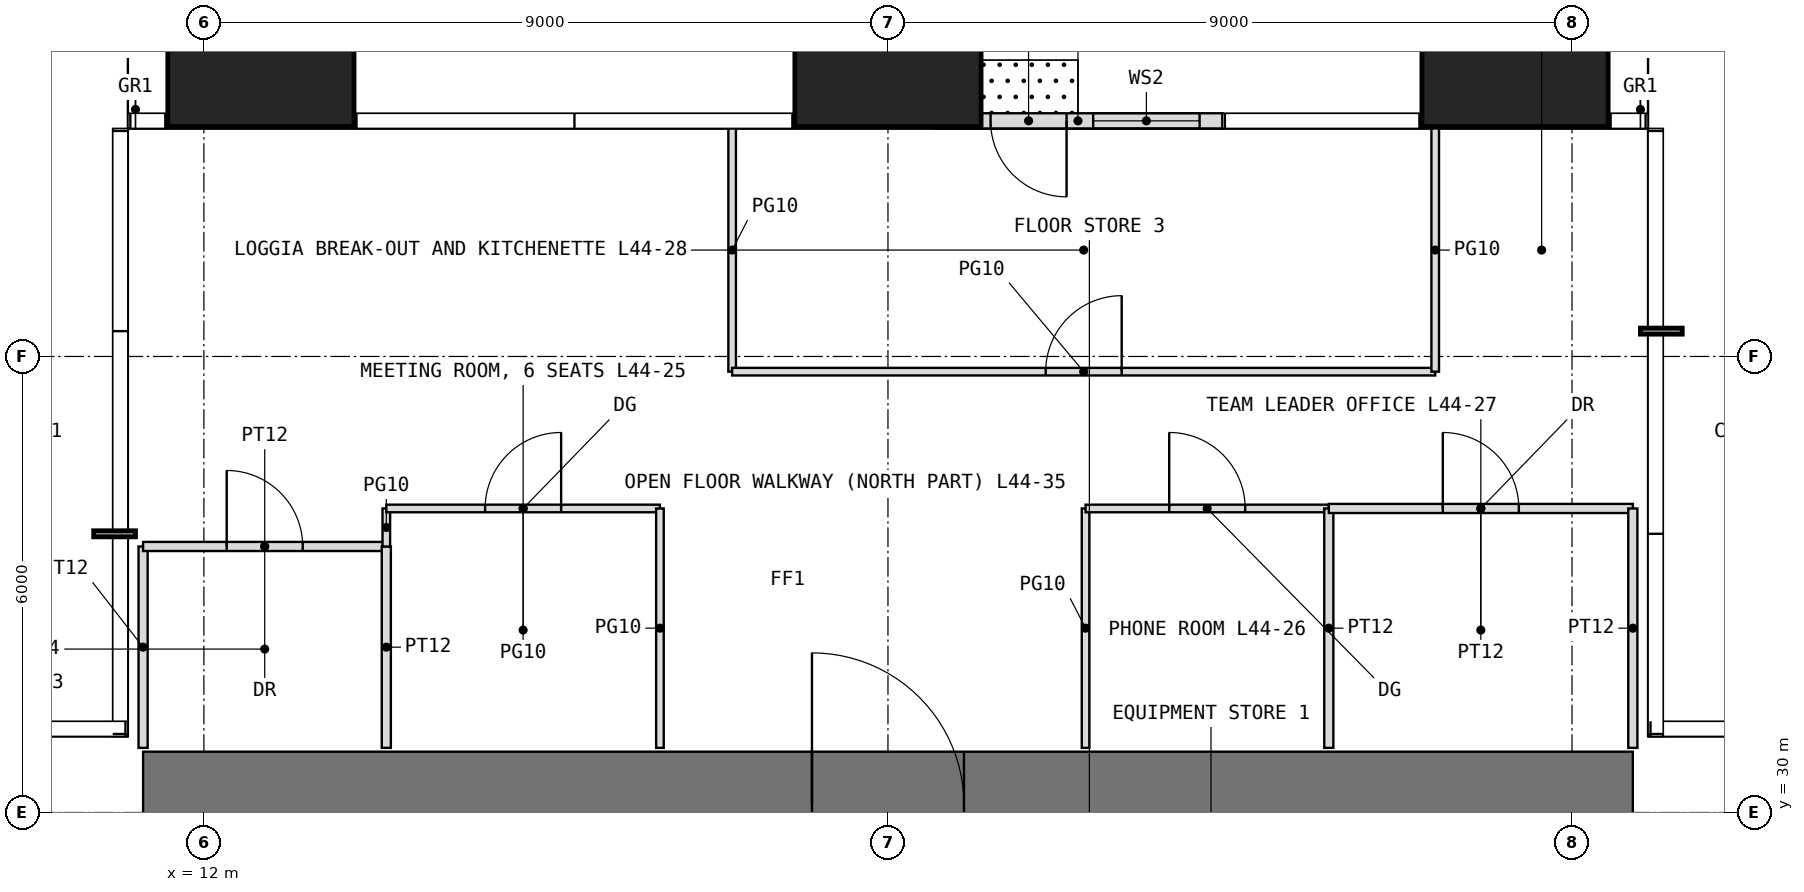
"""IFC4 building model, lengths in metres.
Left out: names, types, materials, properties, quantities, classifications, styles, units other than length and angle.
Written with IfcOpenShell. Run it as: python <this file> out.ifc"""

import sys

from ifc_helpers import new_model, si_unit, direction, frame, frame_2d, origin, origin_2d, place, context, subcontext, project, spatial, rectangle, extrude, element, fill, save


model = new_model("IFC4")
c1 = context("Model", 3, precision=1e-05, world=origin(), true_north=direction((0.0, 1.0)))
c2 = subcontext(c1, "Body", "Model", "MODEL_VIEW")
j1 = project(units=[si_unit("LENGTHUNIT", "METRE"), si_unit("PLANEANGLEUNIT", "RADIAN")], contexts=[c1])
p1 = place(None, origin())
s1 = spatial("IfcSite", under=j1, at=p1, CompositionType="ELEMENT")
p2 = place(p1, origin())
s2 = spatial("IfcBuilding", under=s1, at=p2, CompositionType="ELEMENT")
p3 = place(p2, frame((0.0, 0.0, 186.5)))
s3 = spatial("IfcBuildingStorey", under=s2, at=p3, CompositionType="ELEMENT", Elevation=186.5)
for number, where, z_axis, x_axis in (
    (1, (12.75, 40.25, 0.0), (0.0, 0.0, 1.0), (1.0, 0.0, 0.0)),
    (2, (21.0, 40.25, 0.0), (0.0, 0.0, 1.0), (1.0, 0.0, 0.0)),
    (3, (29.25, 40.25, 0.0), (0.0, 0.0, 1.0), (1.0, 0.0, 0.0)),
):
    element("IfcColumn", number, at=place(p3, frame(where, z_axis=z_axis, x_axis=x_axis)), inside=s3, PredefinedType="COLUMN", context=c2, shape_type="SweptSolid", body=[
        extrude(rectangle(XDim=2.45, YDim=2.45, at=origin_2d()), origin(), (0.0, 0.0, 1.0), 4.0),
    ])
p4 = place(p3, frame((25.4, 39.1, 0.0), z_axis=(0.0, 0.0, 1.0), x_axis=(-1.0, 0.0, 0.0)))
e4 = element("IfcWall", 4, at=p4, inside=s3, PredefinedType="USERDEFINED", context=c2, shape_type="SweptSolid", body=[
    extrude(rectangle(XDim=3.8, YDim=0.2, at=frame_2d((1.9, 0.0))), origin(), (0.0, 0.0, 1.0), 3.75),
])
p5 = place(p4, frame((2.05, 0.0, 0.0)))
e5 = element("IfcOpeningElement", 5, at=p5, cuts=e4, PredefinedType="OPENING", context=c2, shape_type="SweptSolid", body=[
    extrude(rectangle(XDim=1.0, YDim=2.4, at=frame_2d((0.5, 1.2))), frame((0.0, 0.11, 0.0), z_axis=(0.0, -1.0, 0.0), x_axis=(1.0, 0.0, 0.0)), (0.0, 0.0, 1.0), 0.22),
])
p6 = place(p4, frame((0.3, 0.0, 0.3)))
e6 = element("IfcOpeningElement", 6, at=p6, cuts=e4, PredefinedType="OPENING", context=c2, shape_type="SweptSolid", body=[
    extrude(rectangle(XDim=1.4, YDim=2.7, at=frame_2d((0.7, 1.35))), frame((0.0, 0.11, 0.0), z_axis=(0.0, -1.0, 0.0), x_axis=(1.0, 0.0, 0.0)), (0.0, 0.0, 1.0), 0.22),
])
p7 = place(p3, frame((11.2, 30.1, -0.05), z_axis=(0.0, 0.0, 1.0), x_axis=(1.0, 0.0, 0.0)))
e7 = element("IfcWall", 7, at=p7, inside=s3, PredefinedType="SHEAR", context=c2, shape_type="SweptSolid", body=[
    extrude(rectangle(XDim=19.6, YDim=1.4, at=frame_2d((9.8, 0.0))), origin(), (0.0, 0.0, 1.0), 4.0),
])
p8 = place(p7, frame((8.8, 0.0, 0.05)))
e8 = element("IfcOpeningElement", 8, at=p8, cuts=e7, PredefinedType="OPENING", context=c2, shape_type="SweptSolid", body=[
    extrude(rectangle(XDim=2.0, YDim=2.2, at=frame_2d((1.0, 1.1))), frame((0.0, 0.71, 0.0), z_axis=(0.0, -1.0, 0.0), x_axis=(1.0, 0.0, 0.0)), (0.0, 0.0, 1.0), 1.42),
])
p9 = place(p3, frame((11.2, 30.85, 0.0), z_axis=(0.0, 0.0, 1.0), x_axis=(0.0, 1.0, 0.0)))
e9 = element("IfcWall", 9, at=p9, inside=s3, PredefinedType="PARTITIONING", context=c2, shape_type="SweptSolid", body=[
    extrude(rectangle(XDim=2.65, YDim=0.12, at=frame_2d((1.325, 0.0))), origin(), (0.0, 0.0, 1.0), 3.75),
])
p10 = place(p3, frame((11.2, 33.5, 0.0), z_axis=(0.0, 0.0, 1.0), x_axis=(1.0, 0.0, 0.0)))
e10 = element("IfcWall", 10, at=p10, inside=s3, PredefinedType="PARTITIONING", context=c2, shape_type="SweptSolid", body=[
    extrude(rectangle(XDim=3.2, YDim=0.12, at=frame_2d((1.6, 0.0))), origin(), (0.0, 0.0, 1.0), 3.75),
])
p11 = place(p10, frame((1.1, 0.0, 0.0)))
e11 = element("IfcOpeningElement", 11, at=p11, cuts=e10, PredefinedType="OPENING", context=c2, shape_type="SweptSolid", body=[
    extrude(rectangle(XDim=1.0, YDim=2.2, at=frame_2d((0.5, 1.1))), frame((0.0, 0.07, 0.0), z_axis=(0.0, -1.0, 0.0), x_axis=(1.0, 0.0, 0.0)), (0.0, 0.0, 1.0), 0.14),
])
p12 = place(p3, frame((14.4, 30.85, 0.0), z_axis=(0.0, 0.0, 1.0), x_axis=(0.0, 1.0, 0.0)))
e12 = element("IfcWall", 12, at=p12, inside=s3, PredefinedType="PARTITIONING", context=c2, shape_type="SweptSolid", body=[
    extrude(rectangle(XDim=2.65, YDim=0.12, at=frame_2d((1.325, 0.0))), origin(), (0.0, 0.0, 1.0), 3.75),
])
p13 = place(p3, frame((14.4, 33.5, 0.0), z_axis=(0.0, 0.0, 1.0), x_axis=(0.0, 1.0, 0.0)))
e13 = element("IfcWall", 13, at=p13, inside=s3, PredefinedType="PARTITIONING", context=c2, shape_type="SweptSolid", body=[
    extrude(rectangle(XDim=0.5, YDim=0.1, at=frame_2d((0.25, 0.0))), origin(), (0.0, 0.0, 1.0), 3.75),
])
p14 = place(p3, frame((14.4, 34.0, 0.0), z_axis=(0.0, 0.0, 1.0), x_axis=(1.0, 0.0, 0.0)))
e14 = element("IfcWall", 14, at=p14, inside=s3, PredefinedType="PARTITIONING", context=c2, shape_type="SweptSolid", body=[
    extrude(rectangle(XDim=3.6, YDim=0.1, at=frame_2d((1.8, 0.0))), origin(), (0.0, 0.0, 1.0), 3.75),
])
p15 = place(p14, frame((1.3, 0.0, 0.0)))
e15 = element("IfcOpeningElement", 15, at=p15, cuts=e14, PredefinedType="OPENING", context=c2, shape_type="SweptSolid", body=[
    extrude(rectangle(XDim=1.0, YDim=2.4, at=frame_2d((0.5, 1.2))), frame((0.0, 0.06, 0.0), z_axis=(0.0, -1.0, 0.0), x_axis=(1.0, 0.0, 0.0)), (0.0, 0.0, 1.0), 0.12),
])
p16 = place(p3, frame((18.0, 30.85, 0.0), z_axis=(0.0, 0.0, 1.0), x_axis=(0.0, 1.0, 0.0)))
e16 = element("IfcWall", 16, at=p16, inside=s3, PredefinedType="PARTITIONING", context=c2, shape_type="SweptSolid", body=[
    extrude(rectangle(XDim=3.15, YDim=0.1, at=frame_2d((1.575, 0.0))), origin(), (0.0, 0.0, 1.0), 3.75),
])
p17 = place(p3, frame((18.95, 35.8, 0.0), z_axis=(0.0, 0.0, 1.0), x_axis=(0.0, 1.0, 0.0)))
e17 = element("IfcWall", 17, at=p17, inside=s3, PredefinedType="PARTITIONING", context=c2, shape_type="SweptSolid", body=[
    extrude(rectangle(XDim=3.2, YDim=0.1, at=frame_2d((1.6, 0.0))), origin(), (0.0, 0.0, 1.0), 3.75),
])
p18 = place(p3, frame((18.95, 35.8, 0.0), z_axis=(0.0, 0.0, 1.0), x_axis=(1.0, 0.0, 0.0)))
e18 = element("IfcWall", 18, at=p18, inside=s3, PredefinedType="PARTITIONING", context=c2, shape_type="SweptSolid", body=[
    extrude(rectangle(XDim=9.25, YDim=0.1, at=frame_2d((4.625, 0.0))), origin(), (0.0, 0.0, 1.0), 3.75),
])
p19 = place(p18, frame((4.125, 0.0, 0.0)))
e19 = element("IfcOpeningElement", 19, at=p19, cuts=e18, PredefinedType="OPENING", context=c2, shape_type="SweptSolid", body=[
    extrude(rectangle(XDim=1.0, YDim=2.4, at=frame_2d((0.5, 1.2))), frame((0.0, 0.06, 0.0), z_axis=(0.0, -1.0, 0.0), x_axis=(1.0, 0.0, 0.0)), (0.0, 0.0, 1.0), 0.12),
])
p20 = place(p3, frame((23.6, 30.85, 0.0), z_axis=(0.0, 0.0, 1.0), x_axis=(0.0, 1.0, 0.0)))
e20 = element("IfcWall", 20, at=p20, inside=s3, PredefinedType="PARTITIONING", context=c2, shape_type="SweptSolid", body=[
    extrude(rectangle(XDim=3.15, YDim=0.1, at=frame_2d((1.575, 0.0))), origin(), (0.0, 0.0, 1.0), 3.75),
])
p21 = place(p3, frame((23.6, 34.0, 0.0), z_axis=(0.0, 0.0, 1.0), x_axis=(1.0, 0.0, 0.0)))
e21 = element("IfcWall", 21, at=p21, inside=s3, PredefinedType="PARTITIONING", context=c2, shape_type="SweptSolid", body=[
    extrude(rectangle(XDim=3.2, YDim=0.1, at=frame_2d((1.6, 0.0))), origin(), (0.0, 0.0, 1.0), 3.75),
])
p22 = place(p21, frame((1.1, 0.0, 0.0)))
e22 = element("IfcOpeningElement", 22, at=p22, cuts=e21, PredefinedType="OPENING", context=c2, shape_type="SweptSolid", body=[
    extrude(rectangle(XDim=1.0, YDim=2.4, at=frame_2d((0.5, 1.2))), frame((0.0, 0.06, 0.0), z_axis=(0.0, -1.0, 0.0), x_axis=(1.0, 0.0, 0.0)), (0.0, 0.0, 1.0), 0.12),
])
p23 = place(p3, frame((26.8, 30.85, 0.0), z_axis=(0.0, 0.0, 1.0), x_axis=(0.0, 1.0, 0.0)))
e23 = element("IfcWall", 23, at=p23, inside=s3, PredefinedType="PARTITIONING", context=c2, shape_type="SweptSolid", body=[
    extrude(rectangle(XDim=3.15, YDim=0.12, at=frame_2d((1.575, 0.0))), origin(), (0.0, 0.0, 1.0), 3.75),
])
p24 = place(p3, frame((26.8, 34.0, 0.0), z_axis=(0.0, 0.0, 1.0), x_axis=(1.0, 0.0, 0.0)))
e24 = element("IfcWall", 24, at=p24, inside=s3, PredefinedType="PARTITIONING", context=c2, shape_type="SweptSolid", body=[
    extrude(rectangle(XDim=4.0, YDim=0.12, at=frame_2d((2.0, 0.0))), origin(), (0.0, 0.0, 1.0), 3.75),
])
p25 = place(p24, frame((1.5, 0.0, 0.0)))
e25 = element("IfcOpeningElement", 25, at=p25, cuts=e24, PredefinedType="OPENING", context=c2, shape_type="SweptSolid", body=[
    extrude(rectangle(XDim=1.0, YDim=2.2, at=frame_2d((0.5, 1.1))), frame((0.0, 0.07, 0.0), z_axis=(0.0, -1.0, 0.0), x_axis=(1.0, 0.0, 0.0)), (0.0, 0.0, 1.0), 0.14),
])
p26 = place(p3, frame((28.2, 35.8, 0.0), z_axis=(0.0, 0.0, 1.0), x_axis=(0.0, 1.0, 0.0)))
e26 = element("IfcWall", 26, at=p26, inside=s3, PredefinedType="PARTITIONING", context=c2, shape_type="SweptSolid", body=[
    extrude(rectangle(XDim=3.2, YDim=0.1, at=frame_2d((1.6, 0.0))), origin(), (0.0, 0.0, 1.0), 3.75),
])
p27 = place(p3, frame((30.8, 30.85, 0.0), z_axis=(0.0, 0.0, 1.0), x_axis=(0.0, 1.0, 0.0)))
e27 = element("IfcWall", 27, at=p27, inside=s3, PredefinedType="PARTITIONING", context=c2, shape_type="SweptSolid", body=[
    extrude(rectangle(XDim=3.15, YDim=0.12, at=frame_2d((1.575, 0.0))), origin(), (0.0, 0.0, 1.0), 3.75),
])
p28 = place(p5, origin())
e28 = element("IfcDoor", 28, at=p28, inside=s3, OperationType="SINGLE_SWING_LEFT", PredefinedType="DOOR", context=c2, shape_type="SweptSolid", body=[
    extrude(rectangle(XDim=1.0, YDim=2.4, at=frame_2d((0.5, 1.2))), frame((0.0, 0.025, 0.0), z_axis=(0.0, -1.0, 0.0), x_axis=(1.0, 0.0, 0.0)), (0.0, 0.0, 1.0), 0.05),
])
fill(e5, e28)
p29 = place(p6, origin())
e29 = element("IfcWindow", 29, at=p29, inside=s3, PartitioningType="SINGLE_PANEL", PredefinedType="WINDOW", context=c2, shape_type="SweptSolid", body=[
    extrude(rectangle(XDim=1.4, YDim=2.7, at=frame_2d((0.7, 1.35))), frame((0.0, 0.03, 0.0), z_axis=(0.0, -1.0, 0.0), x_axis=(1.0, 0.0, 0.0)), (0.0, 0.0, 1.0), 0.06),
])
fill(e6, e29)
p30 = place(p8, origin())
e30 = element("IfcDoor", 30, at=p30, inside=s3, OperationType="DOUBLE_DOOR_SINGLE_SWING", PredefinedType="DOOR", context=c2, shape_type="SweptSolid", body=[
    extrude(rectangle(XDim=2.0, YDim=2.2, at=frame_2d((1.0, 1.1))), frame((0.0, 0.025, 0.0), z_axis=(0.0, -1.0, 0.0), x_axis=(1.0, 0.0, 0.0)), (0.0, 0.0, 1.0), 0.05),
])
fill(e8, e30)
p31 = place(p11, origin())
e31 = element("IfcDoor", 31, at=p31, inside=s3, OperationType="SINGLE_SWING_LEFT", PredefinedType="DOOR", context=c2, shape_type="SweptSolid", body=[
    extrude(rectangle(XDim=1.0, YDim=2.2, at=frame_2d((0.5, 1.1))), frame((0.0, 0.025, 0.0), z_axis=(0.0, -1.0, 0.0), x_axis=(1.0, 0.0, 0.0)), (0.0, 0.0, 1.0), 0.05),
])
fill(e11, e31)
p32 = place(p15, origin())
e32 = element("IfcDoor", 32, at=p32, inside=s3, OperationType="SINGLE_SWING_RIGHT", PredefinedType="DOOR", context=c2, shape_type="SweptSolid", body=[
    extrude(rectangle(XDim=1.0, YDim=2.4, at=frame_2d((0.5, 1.2))), frame((0.0, 0.025, 0.0), z_axis=(0.0, -1.0, 0.0), x_axis=(1.0, 0.0, 0.0)), (0.0, 0.0, 1.0), 0.05),
])
fill(e15, e32)
p33 = place(p22, origin())
e33 = element("IfcDoor", 33, at=p33, inside=s3, OperationType="SINGLE_SWING_LEFT", PredefinedType="DOOR", context=c2, shape_type="SweptSolid", body=[
    extrude(rectangle(XDim=1.0, YDim=2.4, at=frame_2d((0.5, 1.2))), frame((0.0, 0.025, 0.0), z_axis=(0.0, -1.0, 0.0), x_axis=(1.0, 0.0, 0.0)), (0.0, 0.0, 1.0), 0.05),
])
fill(e22, e33)
p34 = place(p25, origin())
e34 = element("IfcDoor", 34, at=p34, inside=s3, OperationType="SINGLE_SWING_LEFT", PredefinedType="DOOR", context=c2, shape_type="SweptSolid", body=[
    extrude(rectangle(XDim=1.0, YDim=2.2, at=frame_2d((0.5, 1.1))), frame((0.0, 0.025, 0.0), z_axis=(0.0, -1.0, 0.0), x_axis=(1.0, 0.0, 0.0)), (0.0, 0.0, 1.0), 0.05),
])
fill(e25, e34)
p35 = place(p19, origin())
e35 = element("IfcDoor", 35, at=p35, inside=s3, OperationType="SINGLE_SWING_RIGHT", PredefinedType="DOOR", context=c2, shape_type="SweptSolid", body=[
    extrude(rectangle(XDim=1.0, YDim=2.4, at=frame_2d((0.5, 1.2))), frame((0.0, 0.025, 0.0), z_axis=(0.0, -1.0, 0.0), x_axis=(1.0, 0.0, 0.0)), (0.0, 0.0, 1.0), 0.05),
])
fill(e19, e35)
save(model, sys.argv[1])
